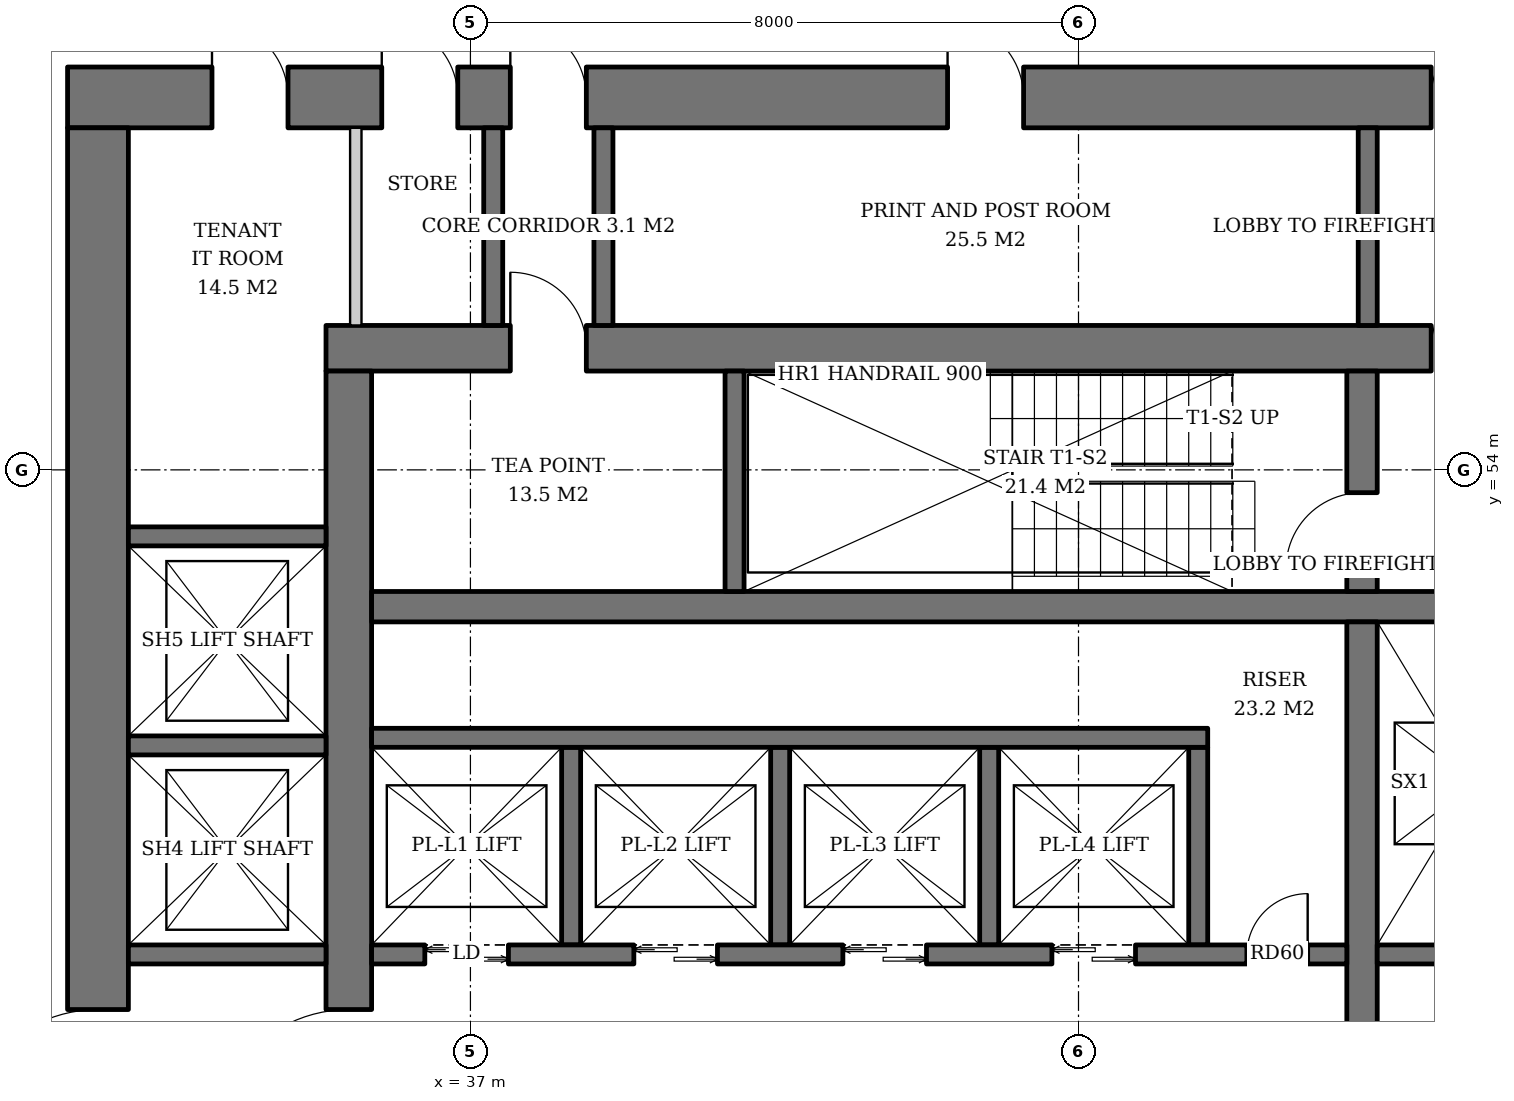
"""IFC4 building model, lengths in metres.
Left out: names, types, materials, properties, quantities, classifications, styles, units other than length and angle.
Written with IfcOpenShell. Run it as: python <this file> out.ifc"""

import sys

from ifc_helpers import new_model, si_unit, direction, frame, frame_2d, origin, place, context, subcontext, project, spatial, rectangle, extrude, element, fill, save


model = new_model("IFC4")
c1 = context("Model", 3, precision=1e-05, world=origin(), true_north=direction((0.0, 1.0)))
c2 = subcontext(c1, "Body", "Model", "MODEL_VIEW")
j1 = project(units=[si_unit("LENGTHUNIT", "METRE"), si_unit("PLANEANGLEUNIT", "RADIAN")], contexts=[c1])
p1 = place(None, origin())
s1 = spatial("IfcSite", under=j1, at=p1, CompositionType="ELEMENT")
p2 = place(p1, origin())
s2 = spatial("IfcBuilding", under=s1, at=p2, CompositionType="ELEMENT")
p3 = place(p2, frame((0.0, 0.0, 28.6)))
s3 = spatial("IfcBuildingStorey", under=s2, at=p3, CompositionType="ELEMENT", Elevation=28.6)
p4 = place(p3, frame((35.1, 55.6, 0.0), z_axis=(0.0, 0.0, 1.0), x_axis=(1.0, 0.0, 0.0)))
e1 = element("IfcWall", 1, at=p4, inside=s3, PredefinedType="SHEAR", context=c2, shape_type="SweptSolid", body=[
    extrude(rectangle(XDim=19.8, YDim=0.6, at=frame_2d((9.9, 0.0))), origin(), (0.0, 0.0, 1.0), 3.8),
])
p5 = place(p4, frame((14.54, 0.0, 0.0)))
e2 = element("IfcOpeningElement", 2, at=p5, cuts=e1, PredefinedType="OPENING", context=c2, shape_type="SweptSolid", body=[
    extrude(rectangle(XDim=1.0, YDim=2.1, at=frame_2d((0.5, 1.05))), frame((0.0, 0.31, 0.0), z_axis=(0.0, -1.0, 0.0), x_axis=(1.0, 0.0, 0.0)), (0.0, 0.0, 1.0), 0.62),
])
p6 = place(p4, frame((2.425, 0.0, 0.0)))
e3 = element("IfcOpeningElement", 3, at=p6, cuts=e1, PredefinedType="OPENING", context=c2, shape_type="SweptSolid", body=[
    extrude(rectangle(XDim=1.0, YDim=2.1, at=frame_2d((0.5, 1.05))), frame((0.0, 0.31, 0.0), z_axis=(0.0, -1.0, 0.0), x_axis=(1.0, 0.0, 0.0)), (0.0, 0.0, 1.0), 0.62),
])
p7 = place(p3, frame((35.4, 36.7, 0.0), z_axis=(0.0, 0.0, 1.0), x_axis=(0.0, 1.0, 0.0)))
e4 = element("IfcWall", 4, at=p7, inside=s3, PredefinedType="SHEAR", context=c2, shape_type="SweptSolid", body=[
    extrude(rectangle(XDim=18.6, YDim=0.6, at=frame_2d((9.3, 0.0))), origin(), (0.0, 0.0, 1.0), 3.8),
])
p8 = place(p7, frame((8.4, 0.0, 0.0)))
e5 = element("IfcOpeningElement", 5, at=p8, cuts=e4, PredefinedType="OPENING", context=c2, shape_type="SweptSolid", body=[
    extrude(rectangle(XDim=1.8, YDim=2.4, at=frame_2d((0.9, 1.2))), frame((0.0, 0.31, 0.0), z_axis=(0.0, -1.0, 0.0), x_axis=(1.0, 0.0, 0.0)), (0.0, 0.0, 1.0), 0.62),
])
p9 = place(p3, frame((31.7, 58.9, 0.0), z_axis=(0.0, 0.0, 1.0), x_axis=(1.0, 0.0, 0.0)))
e6 = element("IfcWall", 6, at=p9, inside=s3, PredefinedType="SHEAR", context=c2, shape_type="SweptSolid", body=[
    extrude(rectangle(XDim=26.6, YDim=0.8, at=frame_2d((13.3, 0.0))), origin(), (0.0, 0.0, 1.0), 3.8),
])
p10 = place(p9, frame((17.94, 0.0, 0.0)))
e7 = element("IfcOpeningElement", 7, at=p10, cuts=e6, PredefinedType="OPENING", context=c2, shape_type="SweptSolid", body=[
    extrude(rectangle(XDim=1.0, YDim=2.1, at=frame_2d((0.5, 1.05))), frame((0.0, 0.41, 0.0), z_axis=(0.0, -1.0, 0.0), x_axis=(1.0, 0.0, 0.0)), (0.0, 0.0, 1.0), 0.82),
])
p11 = place(p9, frame((5.825, 0.0, 0.0)))
e8 = element("IfcOpeningElement", 8, at=p11, cuts=e6, PredefinedType="OPENING", context=c2, shape_type="SweptSolid", body=[
    extrude(rectangle(XDim=1.0, YDim=2.1, at=frame_2d((0.5, 1.05))), frame((0.0, 0.41, 0.0), z_axis=(0.0, -1.0, 0.0), x_axis=(1.0, 0.0, 0.0)), (0.0, 0.0, 1.0), 0.82),
])
p12 = place(p9, frame((1.9, 0.0, 0.0)))
e9 = element("IfcOpeningElement", 9, at=p12, cuts=e6, PredefinedType="OPENING", context=c2, shape_type="SweptSolid", body=[
    extrude(rectangle(XDim=1.0, YDim=2.1, at=frame_2d((0.5, 1.05))), frame((0.0, 0.41, 0.0), z_axis=(0.0, -1.0, 0.0), x_axis=(1.0, 0.0, 0.0)), (0.0, 0.0, 1.0), 0.82),
])
p13 = place(p9, frame((4.134, 0.0, 0.0)))
e10 = element("IfcOpeningElement", 10, at=p13, cuts=e6, PredefinedType="OPENING", context=c2, shape_type="SweptSolid", body=[
    extrude(rectangle(XDim=1.0, YDim=2.1, at=frame_2d((0.5, 1.05))), frame((0.0, 0.41, 0.0), z_axis=(0.0, -1.0, 0.0), x_axis=(1.0, 0.0, 0.0)), (0.0, 0.0, 1.0), 0.82),
])
p14 = place(p9, frame((11.577, 0.0, 0.0)))
e11 = element("IfcOpeningElement", 11, at=p14, cuts=e6, PredefinedType="OPENING", context=c2, shape_type="SweptSolid", body=[
    extrude(rectangle(XDim=1.0, YDim=2.1, at=frame_2d((0.5, 1.05))), frame((0.0, 0.41, 0.0), z_axis=(0.0, -1.0, 0.0), x_axis=(1.0, 0.0, 0.0)), (0.0, 0.0, 1.0), 0.82),
])
p15 = place(p9, frame((20.875, 0.0, 0.0)))
e12 = element("IfcOpeningElement", 12, at=p15, cuts=e6, PredefinedType="OPENING", context=c2, shape_type="SweptSolid", body=[
    extrude(rectangle(XDim=1.0, YDim=2.1, at=frame_2d((0.5, 1.05))), frame((0.0, 0.41, 0.0), z_axis=(0.0, -1.0, 0.0), x_axis=(1.0, 0.0, 0.0)), (0.0, 0.0, 1.0), 0.82),
])
p16 = place(p9, frame((23.7, 0.0, 0.0)))
e13 = element("IfcOpeningElement", 13, at=p16, cuts=e6, PredefinedType="OPENING", context=c2, shape_type="SweptSolid", body=[
    extrude(rectangle(XDim=1.0, YDim=2.1, at=frame_2d((0.5, 1.05))), frame((0.0, 0.41, 0.0), z_axis=(0.0, -1.0, 0.0), x_axis=(1.0, 0.0, 0.0)), (0.0, 0.0, 1.0), 0.82),
])
p17 = place(p3, frame((32.1, 33.5, 0.0), z_axis=(0.0, 0.0, 1.0), x_axis=(0.0, 1.0, 0.0)))
e14 = element("IfcWall", 14, at=p17, inside=s3, PredefinedType="SHEAR", context=c2, shape_type="SweptSolid", body=[
    extrude(rectangle(XDim=25.0, YDim=0.8, at=frame_2d((12.5, 0.0))), origin(), (0.0, 0.0, 1.0), 3.8),
])
p18 = place(p17, frame((11.6, 0.0, 0.0)))
e15 = element("IfcOpeningElement", 15, at=p18, cuts=e14, PredefinedType="OPENING", context=c2, shape_type="SweptSolid", body=[
    extrude(rectangle(XDim=1.8, YDim=2.4, at=frame_2d((0.9, 1.2))), frame((0.0, 0.41, 0.0), z_axis=(0.0, -1.0, 0.0), x_axis=(1.0, 0.0, 0.0)), (0.0, 0.0, 1.0), 0.82),
])
p19 = place(p3, frame((35.7, 52.2, 0.0), z_axis=(0.0, 0.0, 1.0), x_axis=(1.0, 0.0, 0.0)))
e16 = element("IfcWall", 16, at=p19, inside=s3, PredefinedType="SHEAR", context=c2, shape_type="SweptSolid", body=[
    extrude(rectangle(XDim=18.6, YDim=0.4, at=frame_2d((9.3, 0.0))), origin(), (0.0, 0.0, 1.0), 3.8),
])
p20 = place(p3, frame((48.73, 40.0, 0.0), z_axis=(0.0, 0.0, 1.0), x_axis=(0.0, 1.0, 0.0)))
e17 = element("IfcWall", 17, at=p20, inside=s3, PredefinedType="SHEAR", context=c2, shape_type="SweptSolid", body=[
    extrude(rectangle(XDim=12.0, YDim=0.4, at=frame_2d((6.0, 0.0))), origin(), (0.0, 0.0, 1.0), 3.8),
])
p21 = place(p3, frame((48.73, 52.4, 0.0), z_axis=(0.0, 0.0, 1.0), x_axis=(0.0, 1.0, 0.0)))
e18 = element("IfcWall", 18, at=p21, inside=s3, PredefinedType="SHEAR", context=c2, shape_type="SweptSolid", body=[
    extrude(rectangle(XDim=2.9, YDim=0.4, at=frame_2d((1.45, 0.0))), origin(), (0.0, 0.0, 1.0), 3.8),
])
p22 = place(p21, frame((0.3, 0.0, 0.0)))
e19 = element("IfcOpeningElement", 19, at=p22, cuts=e18, PredefinedType="OPENING", context=c2, shape_type="SweptSolid", body=[
    extrude(rectangle(XDim=1.0, YDim=2.1, at=frame_2d((0.5, 1.05))), frame((0.0, 0.21, 0.0), z_axis=(0.0, -1.0, 0.0), x_axis=(1.0, 0.0, 0.0)), (0.0, 0.0, 1.0), 0.42),
])
p23 = place(p3, frame((40.475, 52.4, 0.0), z_axis=(0.0, 0.0, 1.0), x_axis=(0.0, 1.0, 0.0)))
e20 = element("IfcWall", 20, at=p23, inside=s3, PredefinedType="SHEAR", context=c2, shape_type="SweptSolid", body=[
    extrude(rectangle(XDim=2.9, YDim=0.25, at=frame_2d((1.45, 0.0))), origin(), (0.0, 0.0, 1.0), 3.8),
])
for number, where, z_axis, x_axis in (
    (21, (38.325, 47.75, 0.0), (0.0, 0.0, 1.0), (0.0, 1.0, 0.0)),
    (22, (41.075, 47.75, 0.0), (0.0, 0.0, 1.0), (0.0, 1.0, 0.0)),
    (23, (43.825, 47.75, 0.0), (0.0, 0.0, 1.0), (0.0, 1.0, 0.0)),
    (24, (46.575, 47.75, 0.0), (0.0, 0.0, 1.0), (0.0, 1.0, 0.0)),
):
    element("IfcWall", number, at=place(p3, frame(where, z_axis=z_axis, x_axis=x_axis)), inside=s3, PredefinedType="SHEAR", context=c2, shape_type="SweptSolid", body=[
        extrude(rectangle(XDim=2.6, YDim=0.25, at=frame_2d((1.3, 0.0))), origin(), (0.0, 0.0, 1.0), 3.8),
    ])
p24 = place(p3, frame((35.7, 50.475, 0.0), z_axis=(0.0, 0.0, 1.0), x_axis=(1.0, 0.0, 0.0)))
e25 = element("IfcWall", 25, at=p24, inside=s3, PredefinedType="SHEAR", context=c2, shape_type="SweptSolid", body=[
    extrude(rectangle(XDim=11.0, YDim=0.25, at=frame_2d((5.5, 0.0))), origin(), (0.0, 0.0, 1.0), 3.8),
])
p25 = place(p3, frame((35.7, 47.625, 0.0), z_axis=(0.0, 0.0, 1.0), x_axis=(1.0, 0.0, 0.0)))
e26 = element("IfcWall", 26, at=p25, inside=s3, PredefinedType="SHEAR", context=c2, shape_type="SweptSolid", body=[
    extrude(rectangle(XDim=12.83, YDim=0.25, at=frame_2d((6.415, 0.0))), origin(), (0.0, 0.0, 1.0), 3.8),
])
p26 = place(p25, frame((0.7, 0.0, 0.0)))
e27 = element("IfcOpeningElement", 27, at=p26, cuts=e26, PredefinedType="OPENING", context=c2, shape_type="SweptSolid", body=[
    extrude(rectangle(XDim=1.1, YDim=2.2, at=frame_2d((0.55, 1.1))), frame((0.0, 0.135, 0.0), z_axis=(0.0, -1.0, 0.0), x_axis=(1.0, 0.0, 0.0)), (0.0, 0.0, 1.0), 0.27),
])
p27 = place(p25, frame((3.45, 0.0, 0.0)))
e28 = element("IfcOpeningElement", 28, at=p27, cuts=e26, PredefinedType="OPENING", context=c2, shape_type="SweptSolid", body=[
    extrude(rectangle(XDim=1.1, YDim=2.2, at=frame_2d((0.55, 1.1))), frame((0.0, 0.135, 0.0), z_axis=(0.0, -1.0, 0.0), x_axis=(1.0, 0.0, 0.0)), (0.0, 0.0, 1.0), 0.27),
])
p28 = place(p25, frame((6.2, 0.0, 0.0)))
e29 = element("IfcOpeningElement", 29, at=p28, cuts=e26, PredefinedType="OPENING", context=c2, shape_type="SweptSolid", body=[
    extrude(rectangle(XDim=1.1, YDim=2.2, at=frame_2d((0.55, 1.1))), frame((0.0, 0.135, 0.0), z_axis=(0.0, -1.0, 0.0), x_axis=(1.0, 0.0, 0.0)), (0.0, 0.0, 1.0), 0.27),
])
p29 = place(p25, frame((8.95, 0.0, 0.0)))
e30 = element("IfcOpeningElement", 30, at=p29, cuts=e26, PredefinedType="OPENING", context=c2, shape_type="SweptSolid", body=[
    extrude(rectangle(XDim=1.1, YDim=2.2, at=frame_2d((0.55, 1.1))), frame((0.0, 0.135, 0.0), z_axis=(0.0, -1.0, 0.0), x_axis=(1.0, 0.0, 0.0)), (0.0, 0.0, 1.0), 0.27),
])
p30 = place(p25, frame((11.515, 0.0, 0.0)))
e31 = element("IfcOpeningElement", 31, at=p30, cuts=e26, PredefinedType="OPENING", context=c2, shape_type="SweptSolid", body=[
    extrude(rectangle(XDim=0.8, YDim=2.0, at=frame_2d((0.4, 1.0))), frame((0.0, 0.135, 0.0), z_axis=(0.0, -1.0, 0.0), x_axis=(1.0, 0.0, 0.0)), (0.0, 0.0, 1.0), 0.27),
])
p31 = place(p3, frame((48.93, 47.625, 0.0), z_axis=(0.0, 0.0, 1.0), x_axis=(1.0, 0.0, 0.0)))
e32 = element("IfcWall", 32, at=p31, inside=s3, PredefinedType="SHEAR", context=c2, shape_type="SweptSolid", body=[
    extrude(rectangle(XDim=5.37, YDim=0.25, at=frame_2d((2.685, 0.0))), origin(), (0.0, 0.0, 1.0), 3.8),
])
for number, where, z_axis, x_axis in (
    (33, (32.5, 47.625, 0.0), (0.0, 0.0, 1.0), (1.0, 0.0, 0.0)),
    (34, (32.5, 50.375, 0.0), (0.0, 0.0, 1.0), (1.0, 0.0, 0.0)),
    (35, (32.5, 53.125, 0.0), (0.0, 0.0, 1.0), (1.0, 0.0, 0.0)),
):
    element("IfcWall", number, at=place(p3, frame(where, z_axis=z_axis, x_axis=x_axis)), inside=s3, PredefinedType="SHEAR", context=c2, shape_type="SweptSolid", body=[
        extrude(rectangle(XDim=2.6, YDim=0.25, at=frame_2d((1.3, 0.0))), origin(), (0.0, 0.0, 1.0), 3.8),
    ])
for number, where, z_axis, x_axis in (
    (36, (48.805, 55.9, 0.0), (0.0, 0.0, 1.0), (0.0, 1.0, 0.0)),
    (37, (37.3, 55.9, 0.0), (0.0, 0.0, 1.0), (0.0, 1.0, 0.0)),
    (38, (38.75, 55.9, 0.0), (0.0, 0.0, 1.0), (0.0, 1.0, 0.0)),
):
    element("IfcWall", number, at=place(p3, frame(where, z_axis=z_axis, x_axis=x_axis)), inside=s3, PredefinedType="SOLIDWALL", context=c2, shape_type="SweptSolid", body=[
        extrude(rectangle(XDim=2.6, YDim=0.25, at=frame_2d((1.3, 0.0))), origin(), (0.0, 0.0, 1.0), 3.62),
    ])
p32 = place(p3, frame((35.492, 55.9, 0.0), z_axis=(0.0, 0.0, 1.0), x_axis=(0.0, 1.0, 0.0)))
e39 = element("IfcWall", 39, at=p32, inside=s3, PredefinedType="SOLIDWALL", context=c2, shape_type="SweptSolid", body=[
    extrude(rectangle(XDim=2.6, YDim=0.15, at=frame_2d((1.3, 0.0))), origin(), (0.0, 0.0, 1.0), 3.62),
])
p33 = place(p26, origin())
e40 = element("IfcDoor", 40, at=p33, inside=s3, OperationType="DOUBLE_DOOR_SLIDING", PredefinedType="DOOR", context=c2, shape_type="SweptSolid", body=[
    extrude(rectangle(XDim=1.1, YDim=2.2, at=frame_2d((0.55, 1.1))), frame((0.0, 0.025, 0.0), z_axis=(0.0, -1.0, 0.0), x_axis=(1.0, 0.0, 0.0)), (0.0, 0.0, 1.0), 0.05),
])
fill(e27, e40)
p34 = place(p27, origin())
e41 = element("IfcDoor", 41, at=p34, inside=s3, OperationType="DOUBLE_DOOR_SLIDING", PredefinedType="DOOR", context=c2, shape_type="SweptSolid", body=[
    extrude(rectangle(XDim=1.1, YDim=2.2, at=frame_2d((0.55, 1.1))), frame((0.0, 0.025, 0.0), z_axis=(0.0, -1.0, 0.0), x_axis=(1.0, 0.0, 0.0)), (0.0, 0.0, 1.0), 0.05),
])
fill(e28, e41)
p35 = place(p28, origin())
e42 = element("IfcDoor", 42, at=p35, inside=s3, OperationType="DOUBLE_DOOR_SLIDING", PredefinedType="DOOR", context=c2, shape_type="SweptSolid", body=[
    extrude(rectangle(XDim=1.1, YDim=2.2, at=frame_2d((0.55, 1.1))), frame((0.0, 0.025, 0.0), z_axis=(0.0, -1.0, 0.0), x_axis=(1.0, 0.0, 0.0)), (0.0, 0.0, 1.0), 0.05),
])
fill(e29, e42)
p36 = place(p29, origin())
e43 = element("IfcDoor", 43, at=p36, inside=s3, OperationType="DOUBLE_DOOR_SLIDING", PredefinedType="DOOR", context=c2, shape_type="SweptSolid", body=[
    extrude(rectangle(XDim=1.1, YDim=2.2, at=frame_2d((0.55, 1.1))), frame((0.0, 0.025, 0.0), z_axis=(0.0, -1.0, 0.0), x_axis=(1.0, 0.0, 0.0)), (0.0, 0.0, 1.0), 0.05),
])
fill(e30, e43)
p37 = place(p30, origin())
e44 = element("IfcDoor", 44, at=p37, inside=s3, OperationType="SINGLE_SWING_RIGHT", PredefinedType="DOOR", context=c2, shape_type="SweptSolid", body=[
    extrude(rectangle(XDim=0.8, YDim=2.0, at=frame_2d((0.4, 1.0))), frame((0.0, 0.025, 0.0), z_axis=(0.0, -1.0, 0.0), x_axis=(1.0, 0.0, 0.0)), (0.0, 0.0, 1.0), 0.05),
])
fill(e31, e44)
p38 = place(p22, origin())
e45 = element("IfcDoor", 45, at=p38, inside=s3, OperationType="SINGLE_SWING_LEFT", PredefinedType="DOOR", context=c2, shape_type="SweptSolid", body=[
    extrude(rectangle(XDim=1.0, YDim=2.1, at=frame_2d((0.5, 1.05))), frame((0.0, 0.025, 0.0), z_axis=(0.0, -1.0, 0.0), x_axis=(1.0, 0.0, 0.0)), (0.0, 0.0, 1.0), 0.05),
])
fill(e19, e45)
p39 = place(p5, origin())
e46 = element("IfcDoor", 46, at=p39, inside=s3, OperationType="SINGLE_SWING_RIGHT", PredefinedType="DOOR", context=c2, shape_type="SweptSolid", body=[
    extrude(rectangle(XDim=1.0, YDim=2.1, at=frame_2d((0.5, 1.05))), frame((0.0, 0.025, 0.0), z_axis=(0.0, -1.0, 0.0), x_axis=(1.0, 0.0, 0.0)), (0.0, 0.0, 1.0), 0.05),
])
fill(e2, e46)
p40 = place(p8, origin())
e47 = element("IfcDoor", 47, at=p40, inside=s3, OperationType="DOUBLE_DOOR_SINGLE_SWING", PredefinedType="DOOR", context=c2, shape_type="SweptSolid", body=[
    extrude(rectangle(XDim=1.8, YDim=2.4, at=frame_2d((0.9, 1.2))), frame((0.0, 0.025, 0.0), z_axis=(0.0, -1.0, 0.0), x_axis=(1.0, 0.0, 0.0)), (0.0, 0.0, 1.0), 0.05),
])
fill(e5, e47)
p41 = place(p18, origin())
e48 = element("IfcDoor", 48, at=p41, inside=s3, OperationType="DOUBLE_DOOR_SINGLE_SWING", PredefinedType="DOOR", context=c2, shape_type="SweptSolid", body=[
    extrude(rectangle(XDim=1.8, YDim=2.4, at=frame_2d((0.9, 1.2))), frame((0.0, 0.025, 0.0), z_axis=(0.0, -1.0, 0.0), x_axis=(1.0, 0.0, 0.0)), (0.0, 0.0, 1.0), 0.05),
])
fill(e15, e48)
p42 = place(p10, origin())
e49 = element("IfcDoor", 49, at=p42, inside=s3, OperationType="SINGLE_SWING_RIGHT", PredefinedType="DOOR", context=c2, shape_type="SweptSolid", body=[
    extrude(rectangle(XDim=1.0, YDim=2.1, at=frame_2d((0.5, 1.05))), frame((0.0, 0.025, 0.0), z_axis=(0.0, -1.0, 0.0), x_axis=(1.0, 0.0, 0.0)), (0.0, 0.0, 1.0), 0.05),
])
fill(e7, e49)
p43 = place(p11, origin())
e50 = element("IfcDoor", 50, at=p43, inside=s3, OperationType="SINGLE_SWING_LEFT", PredefinedType="DOOR", context=c2, shape_type="SweptSolid", body=[
    extrude(rectangle(XDim=1.0, YDim=2.1, at=frame_2d((0.5, 1.05))), frame((0.0, 0.025, 0.0), z_axis=(0.0, -1.0, 0.0), x_axis=(1.0, 0.0, 0.0)), (0.0, 0.0, 1.0), 0.05),
])
fill(e8, e50)
p44 = place(p6, origin())
e51 = element("IfcDoor", 51, at=p44, inside=s3, OperationType="SINGLE_SWING_LEFT", PredefinedType="DOOR", context=c2, shape_type="SweptSolid", body=[
    extrude(rectangle(XDim=1.0, YDim=2.1, at=frame_2d((0.5, 1.05))), frame((0.0, -0.24, 0.0), z_axis=(0.0, -1.0, 0.0), x_axis=(1.0, 0.0, 0.0)), (0.0, 0.0, 1.0), 0.05),
])
fill(e3, e51)
p45 = place(p12, origin())
e52 = element("IfcDoor", 52, at=p45, inside=s3, OperationType="SINGLE_SWING_LEFT", PredefinedType="DOOR", context=c2, shape_type="SweptSolid", body=[
    extrude(rectangle(XDim=1.0, YDim=2.1, at=frame_2d((0.5, 1.05))), frame((0.0, -0.34, 0.0), z_axis=(0.0, -1.0, 0.0), x_axis=(1.0, 0.0, 0.0)), (0.0, 0.0, 1.0), 0.05),
])
fill(e9, e52)
p46 = place(p13, origin())
e53 = element("IfcDoor", 53, at=p46, inside=s3, OperationType="SINGLE_SWING_LEFT", PredefinedType="DOOR", context=c2, shape_type="SweptSolid", body=[
    extrude(rectangle(XDim=1.0, YDim=2.1, at=frame_2d((0.5, 1.05))), frame((0.0, -0.34, 0.0), z_axis=(0.0, -1.0, 0.0), x_axis=(1.0, 0.0, 0.0)), (0.0, 0.0, 1.0), 0.05),
])
fill(e10, e53)
p47 = place(p14, origin())
e54 = element("IfcDoor", 54, at=p47, inside=s3, OperationType="SINGLE_SWING_LEFT", PredefinedType="DOOR", context=c2, shape_type="SweptSolid", body=[
    extrude(rectangle(XDim=1.0, YDim=2.1, at=frame_2d((0.5, 1.05))), frame((0.0, -0.34, 0.0), z_axis=(0.0, -1.0, 0.0), x_axis=(1.0, 0.0, 0.0)), (0.0, 0.0, 1.0), 0.05),
])
fill(e11, e54)
save(model, sys.argv[1])
